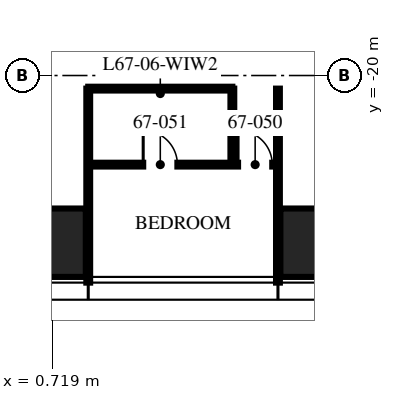
"""IFC4 building model, lengths in metres.
Left out: names, types, materials, properties, quantities, classifications, styles, units other than length and angle.
Written with IfcOpenShell. Run it as: python <this file> out.ifc"""

import sys

from ifc_helpers import new_model, si_unit, direction, frame, frame_2d, origin, origin_2d, place, context, subcontext, project, spatial, rectangle, hollow_rectangle, extrude, element, fill, save


model = new_model("IFC4")
c1 = context("Model", 3, precision=1e-05, world=origin(), true_north=direction((0.0, 1.0)))
c2 = subcontext(c1, "Body", "Model", "MODEL_VIEW")
j1 = project(units=[si_unit("LENGTHUNIT", "METRE"), si_unit("PLANEANGLEUNIT", "RADIAN")], contexts=[c1])
p1 = place(None, origin())
s1 = spatial("IfcSite", under=j1, at=p1, CompositionType="ELEMENT")
p2 = place(p1, origin())
s2 = spatial("IfcBuilding", under=s1, at=p2, CompositionType="ELEMENT")
p3 = place(p2, frame((0.0, 0.0, 267.0)))
s3 = spatial("IfcBuildingStorey", under=s2, at=p3, CompositionType="ELEMENT", Elevation=267.0)
for number, where, z_axis, x_axis in (
    (1, (8.32, -24.4, 0.0), (0.0, 0.0, 1.0), (1.0, 0.0, 0.0)),
    (2, (0.0, -24.4, 0.0), (0.0, 0.0, 1.0), (1.0, 0.0, 0.0)),
):
    element("IfcColumn", number, at=place(p3, frame(where, z_axis=z_axis, x_axis=x_axis)), inside=s3, PredefinedType="COLUMN", context=c2, shape_type="SweptSolid", body=[
        extrude(hollow_rectangle(XDim=3.2, YDim=1.8, WallThickness=0.14, at=origin_2d()), origin(), (0.0, 0.0, 1.0), 3.75),
    ])
for number, where, z_axis, x_axis in (
    (3, (1.664, -20.345, 0.0), (0.0, 0.0, 1.0), (0.0, -1.0, 0.0)),
    (4, (6.656, -20.345, 0.0), (0.0, 0.0, 1.0), (0.0, -1.0, 0.0)),
):
    element("IfcWall", number, at=place(p3, frame(where, z_axis=z_axis, x_axis=x_axis)), inside=s3, PredefinedType="PARTITIONING", context=c2, shape_type="SweptSolid", body=[
        extrude(rectangle(XDim=5.105, YDim=0.1, at=frame_2d((2.552, 0.0))), origin(), (0.0, 0.0, 1.0), 2.91),
    ])
p4 = place(p3, frame((1.664, -22.345, 0.0), z_axis=(0.0, 0.0, 1.0), x_axis=(1.0, 0.0, 0.0)))
e5 = element("IfcWall", 5, at=p4, inside=s3, PredefinedType="PARTITIONING", context=c2, shape_type="SweptSolid", body=[
    extrude(rectangle(XDim=4.992, YDim=0.1, at=frame_2d((2.496, 0.0))), origin(), (0.0, 0.0, 1.0), 2.81),
])
p5 = place(p4, frame((3.942, 0.0, 0.0)))
e6 = element("IfcOpeningElement", 6, at=p5, cuts=e5, PredefinedType="OPENING", context=c2, shape_type="SweptSolid", body=[
    extrude(rectangle(XDim=0.9, YDim=2.1, at=frame_2d((0.45, 1.05))), frame((0.0, 0.06, 0.0), z_axis=(0.0, -1.0, 0.0), x_axis=(1.0, 0.0, 0.0)), (0.0, 0.0, 1.0), 0.12),
])
p6 = place(p4, frame((1.446, 0.0, 0.0)))
e7 = element("IfcOpeningElement", 7, at=p6, cuts=e5, PredefinedType="OPENING", context=c2, shape_type="SweptSolid", body=[
    extrude(rectangle(XDim=0.9, YDim=2.1, at=frame_2d((0.45, 1.05))), frame((0.0, 0.06, 0.0), z_axis=(0.0, -1.0, 0.0), x_axis=(1.0, 0.0, 0.0)), (0.0, 0.0, 1.0), 0.12),
])
p7 = place(p3, frame((5.456, -20.345, 0.0), z_axis=(0.0, 0.0, 1.0), x_axis=(0.0, -1.0, 0.0)))
e8 = element("IfcWall", 8, at=p7, inside=s3, PredefinedType="PARTITIONING", context=c2, shape_type="SweptSolid", body=[
    extrude(rectangle(XDim=2.0, YDim=0.1, at=frame_2d((1.0, 0.0))), origin(), (0.0, 0.0, 1.0), 3.5),
])
p8 = place(p3, frame((1.664, -20.345, 0.0), z_axis=(0.0, 0.0, 1.0), x_axis=(1.0, 0.0, 0.0)))
e9 = element("IfcWall", 9, at=p8, inside=s3, PredefinedType="PARTITIONING", context=c2, shape_type="SweptSolid", body=[
    extrude(rectangle(XDim=3.792, YDim=0.1, at=frame_2d((1.896, 0.0))), origin(), (0.0, 0.0, 1.0), 2.81),
])
p9 = place(p5, origin())
e10 = element("IfcDoor", 10, at=p9, inside=s3, OperationType="SINGLE_SWING_LEFT", PredefinedType="DOOR", context=c2, shape_type="SweptSolid", body=[
    extrude(rectangle(XDim=0.9, YDim=2.1, at=frame_2d((0.45, 1.05))), frame((0.0, 0.025, 0.0), z_axis=(0.0, -1.0, 0.0), x_axis=(1.0, 0.0, 0.0)), (0.0, 0.0, 1.0), 0.05),
])
fill(e6, e10)
p10 = place(p6, origin())
e11 = element("IfcDoor", 11, at=p10, inside=s3, OperationType="SINGLE_SWING_LEFT", PredefinedType="DOOR", context=c2, shape_type="SweptSolid", body=[
    extrude(rectangle(XDim=0.9, YDim=2.1, at=frame_2d((0.45, 1.05))), frame((0.0, 0.025, 0.0), z_axis=(0.0, -1.0, 0.0), x_axis=(1.0, 0.0, 0.0)), (0.0, 0.0, 1.0), 0.05),
])
fill(e7, e11)
save(model, sys.argv[1])
